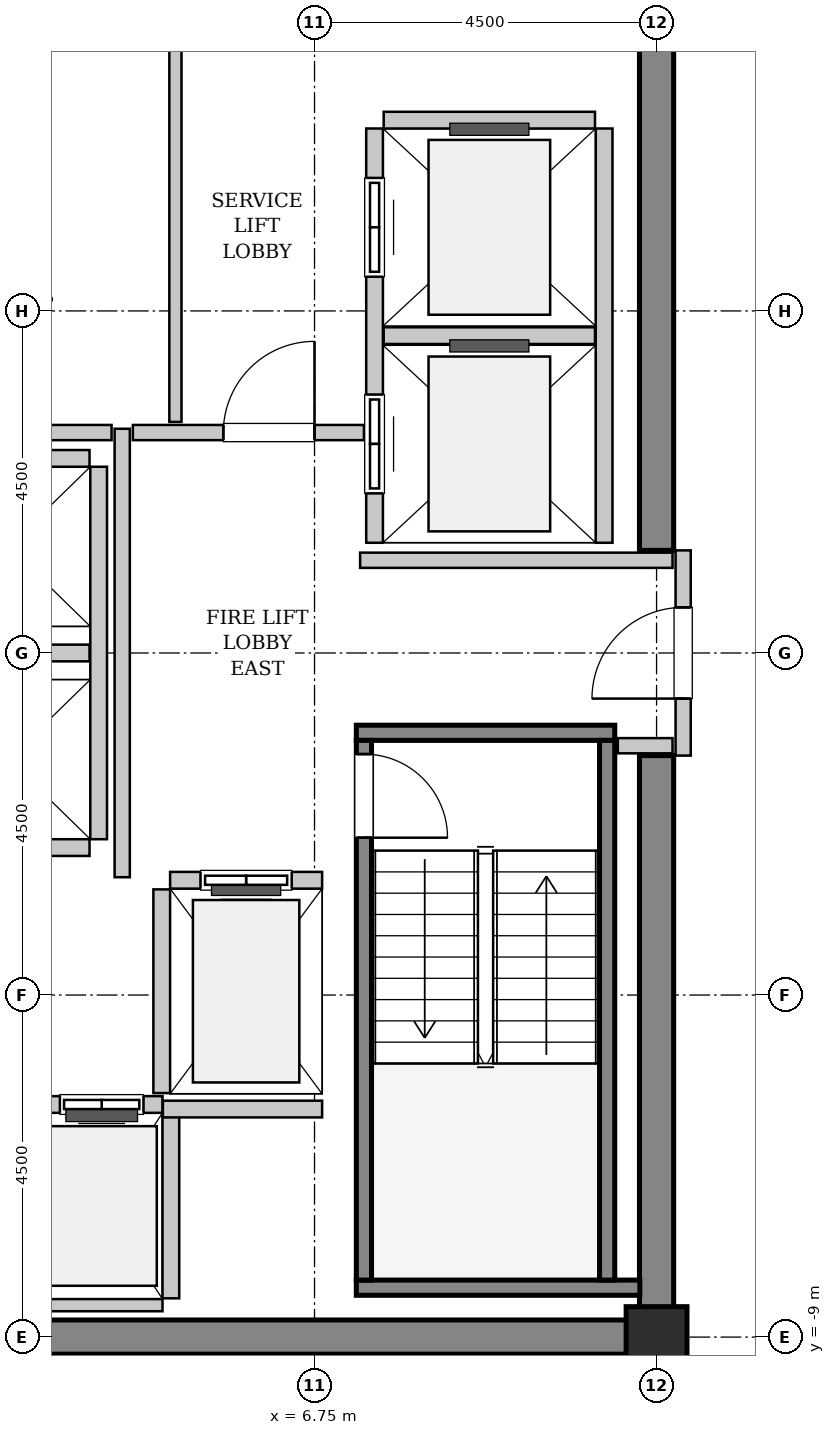
"""IFC4 building model, lengths in metres.
Left out: names, types, materials, properties, quantities, classifications, styles, units other than length and angle.
Written with IfcOpenShell. Run it as: python <this file> out.ifc"""

import sys

from ifc_helpers import new_model, si_unit, direction, frame, frame_2d, origin, origin_2d, place, context, subcontext, project, spatial, rectangle, hollow_rectangle, extrude, source, transform, mapped, element, fill, save


model = new_model("IFC4")
c1 = context("Model", 3, precision=1e-05, world=origin(), true_north=direction((0.0, 1.0)))
c2 = subcontext(c1, "Body", "Model", "MODEL_VIEW")
j1 = project(units=[si_unit("LENGTHUNIT", "METRE"), si_unit("PLANEANGLEUNIT", "RADIAN")], contexts=[c1])
p1 = place(None, origin())
s1 = spatial("IfcSite", under=j1, at=p1, CompositionType="ELEMENT")
p2 = place(p1, origin())
s2 = spatial("IfcBuilding", under=s1, at=p2, CompositionType="ELEMENT")
p3 = place(p2, frame((0.0, 0.0, 229.4)))
s3 = spatial("IfcBuildingStorey", under=s2, at=p3, CompositionType="ELEMENT", Elevation=229.4)
m1 = source(origin(), c2, "Body", "SweptSolid", [
    extrude(rectangle(XDim=9.925, YDim=0.45, at=frame_2d((4.962, 0.0))), origin(), (0.0, 0.0, 1.0), 3.8),
])
p4 = place(p3, frame((1.55, -9.0, 0.0), z_axis=(0.0, 0.0, 1.0), x_axis=(1.0, 0.0, 0.0)))
e1 = element("IfcWall", 1, at=p4, inside=s3, PredefinedType="SHEAR", context=c2, shape_type="MappedRepresentation", body=[
    mapped(m1, transform((0.0, 0.0, 0.0), x_axis=(1.0, 0.0, 0.0), y_axis=(0.0, 1.0, 0.0), z_axis=(0.0, 0.0, 1.0), scale=1.0)),
])
m2 = source(origin(), c2, "Body", "SweptSolid", [
    extrude(rectangle(XDim=7.425, YDim=0.45, at=frame_2d((3.712, 0.0))), origin(), (0.0, 0.0, 1.0), 3.8),
])
for number, where, z_axis, x_axis in (
    (2, (11.25, -8.775, 0.0), (0.0, 0.0, 1.0), (0.0, 1.0, 0.0)),
    (3, (11.25, 1.35, 0.0), (0.0, 0.0, 1.0), (0.0, 1.0, 0.0)),
):
    element("IfcWall", number, at=place(p3, frame(where, z_axis=z_axis, x_axis=x_axis)), inside=s3, PredefinedType="SHEAR", context=c2, shape_type="MappedRepresentation", body=[
        mapped(m2, transform((0.0, 0.0, 0.0), x_axis=(1.0, 0.0, 0.0), y_axis=(0.0, 1.0, 0.0), z_axis=(0.0, 0.0, 1.0), scale=1.0)),
    ])
m3 = source(origin(), c2, "Body", "SweptSolid", [
    extrude(hollow_rectangle(XDim=0.8, YDim=0.8, WallThickness=0.04, InnerFilletRadius=0.04, OuterFilletRadius=0.08, at=origin_2d()), origin(), (0.0, 0.0, 1.0), 3.8),
])
p5 = place(p3, frame((11.25, -9.0, 0.0), z_axis=(0.0, 0.0, 1.0), x_axis=(1.0, 0.0, 0.0)))
e4 = element("IfcColumn", 4, at=p5, inside=s3, PredefinedType="COLUMN", context=c2, shape_type="MappedRepresentation", body=[
    mapped(m3, transform((0.0, 0.0, 0.0), x_axis=(1.0, 0.0, 0.0), y_axis=(0.0, 1.0, 0.0), z_axis=(0.0, 0.0, 1.0), scale=1.0)),
])
m4 = source(origin(), c2, "Body", "SweptSolid", [
    extrude(rectangle(XDim=3.4, YDim=0.2, at=frame_2d((1.7, 0.0))), origin(), (0.0, 0.0, 1.0), 3.8),
])
p6 = place(p3, frame((7.3, -1.05, 0.0), z_axis=(0.0, 0.0, 1.0), x_axis=(1.0, 0.0, 0.0)))
e5 = element("IfcWall", 5, at=p6, inside=s3, PredefinedType="SOLIDWALL", context=c2, shape_type="MappedRepresentation", body=[
    mapped(m4, transform((0.0, 0.0, 0.0), x_axis=(1.0, 0.0, 0.0), y_axis=(0.0, 1.0, 0.0), z_axis=(0.0, 0.0, 1.0), scale=1.0)),
])
m5 = source(origin(), c2, "Body", "SweptSolid", [
    extrude(rectangle(XDim=3.73, YDim=0.2, at=frame_2d((1.865, 0.0))), origin(), (0.0, 0.0, 1.0), 3.8),
])
p7 = place(p3, frame((7.3, -8.35, 0.0), z_axis=(0.0, 0.0, 1.0), x_axis=(1.0, 0.0, 0.0)))
e6 = element("IfcWall", 6, at=p7, inside=s3, PredefinedType="SOLIDWALL", context=c2, shape_type="MappedRepresentation", body=[
    mapped(m5, transform((0.0, 0.0, 0.0), x_axis=(1.0, 0.0, 0.0), y_axis=(0.0, 1.0, 0.0), z_axis=(0.0, 0.0, 1.0), scale=1.0)),
])
m6 = source(origin(), c2, "Body", "SweptSolid", [
    extrude(rectangle(XDim=7.1, YDim=0.2, at=frame_2d((3.55, 0.0))), origin(), (0.0, 0.0, 1.0), 3.8),
])
p8 = place(p3, frame((7.4, -1.15, 0.0), z_axis=(0.0, 0.0, 1.0), x_axis=(0.0, -1.0, 0.0)))
e7 = element("IfcWall", 7, at=p8, inside=s3, PredefinedType="SOLIDWALL", context=c2, shape_type="MappedRepresentation", body=[
    mapped(m6, transform((0.0, 0.0, 0.0), x_axis=(1.0, 0.0, 0.0), y_axis=(0.0, 1.0, 0.0), z_axis=(0.0, 0.0, 1.0), scale=1.0)),
])
p9 = place(p8, frame((0.18, 0.0, 0.0)))
e8 = element("IfcOpeningElement", 8, at=p9, cuts=e7, PredefinedType="OPENING", context=c2, shape_type="SweptSolid", body=[
    extrude(rectangle(XDim=1.1, YDim=2.15, at=frame_2d((0.55, 1.075))), frame((0.0, 0.11, 0.0), z_axis=(0.0, -1.0, 0.0), x_axis=(1.0, 0.0, 0.0)), (0.0, 0.0, 1.0), 0.22),
])
p10 = place(p3, frame((10.6, -1.15, 0.0), z_axis=(0.0, 0.0, 1.0), x_axis=(0.0, -1.0, 0.0)))
e9 = element("IfcWall", 9, at=p10, inside=s3, PredefinedType="SOLIDWALL", context=c2, shape_type="MappedRepresentation", body=[
    mapped(m6, transform((0.0, 0.0, 0.0), x_axis=(1.0, 0.0, 0.0), y_axis=(0.0, 1.0, 0.0), z_axis=(0.0, 0.0, 1.0), scale=1.0)),
])
m7 = source(origin(), c2, "Body", "SweptSolid", [
    extrude(rectangle(XDim=2.0, YDim=0.22, at=frame_2d((1.0, 0.0))), origin(), (0.0, 0.0, 1.0), 3.535),
])
p11 = place(p3, frame((6.85, -2.99, 0.0), z_axis=(0.0, 0.0, 1.0), x_axis=(-1.0, 0.0, 0.0)))
e10 = element("IfcWall", 10, at=p11, inside=s3, PredefinedType="SOLIDWALL", context=c2, shape_type="MappedRepresentation", body=[
    mapped(m7, transform((0.0, 0.0, 0.0), x_axis=(1.0, 0.0, 0.0), y_axis=(0.0, 1.0, 0.0), z_axis=(0.0, 0.0, 1.0), scale=1.0)),
])
p12 = place(p11, frame((0.4, 0.0, 0.0)))
e11 = element("IfcOpeningElement", 11, at=p12, cuts=e10, PredefinedType="OPENING", context=c2, shape_type="SweptSolid", body=[
    extrude(rectangle(XDim=1.2, YDim=2.2, at=frame_2d((0.6, 1.1))), frame((0.0, 0.12, 0.0), z_axis=(0.0, -1.0, 0.0), x_axis=(1.0, 0.0, 0.0)), (0.0, 0.0, 1.0), 0.24),
])
m8 = source(origin(), c2, "Body", "SweptSolid", [
    extrude(rectangle(XDim=2.68, YDim=0.22, at=frame_2d((1.34, 0.0))), origin(), (0.0, 0.0, 1.0), 3.535),
])
p13 = place(p3, frame((4.74, -3.11, 0.0), z_axis=(0.0, 0.0, 1.0), x_axis=(0.0, -1.0, 0.0)))
e12 = element("IfcWall", 12, at=p13, inside=s3, PredefinedType="SOLIDWALL", context=c2, shape_type="MappedRepresentation", body=[
    mapped(m8, transform((0.0, 0.0, 0.0), x_axis=(1.0, 0.0, 0.0), y_axis=(0.0, 1.0, 0.0), z_axis=(0.0, 0.0, 1.0), scale=1.0)),
])
m9 = source(origin(), c2, "Body", "SweptSolid", [
    extrude(rectangle(XDim=5.45, YDim=0.22, at=frame_2d((2.725, 0.0))), origin(), (0.0, 0.0, 1.0), 3.535),
])
p14 = place(p3, frame((7.54, 6.9, 0.0), z_axis=(0.0, 0.0, 1.0), x_axis=(0.0, -1.0, 0.0)))
e13 = element("IfcWall", 13, at=p14, inside=s3, PredefinedType="SOLIDWALL", context=c2, shape_type="MappedRepresentation", body=[
    mapped(m9, transform((0.0, 0.0, 0.0), x_axis=(1.0, 0.0, 0.0), y_axis=(0.0, 1.0, 0.0), z_axis=(0.0, 0.0, 1.0), scale=1.0)),
])
p15 = place(p14, frame((3.5, 0.0, 0.0)))
e14 = element("IfcOpeningElement", 14, at=p15, cuts=e13, PredefinedType="OPENING", context=c2, shape_type="SweptSolid", body=[
    extrude(rectangle(XDim=1.3, YDim=2.3, at=frame_2d((0.65, 1.15))), frame((0.0, 0.12, 0.0), z_axis=(0.0, -1.0, 0.0), x_axis=(1.0, 0.0, 0.0)), (0.0, 0.0, 1.0), 0.24),
])
p16 = place(p14, frame((0.65, 0.0, 0.0)))
e15 = element("IfcOpeningElement", 15, at=p16, cuts=e13, PredefinedType="OPENING", context=c2, shape_type="SweptSolid", body=[
    extrude(rectangle(XDim=1.3, YDim=2.3, at=frame_2d((0.65, 1.15))), frame((0.0, 0.12, 0.0), z_axis=(0.0, -1.0, 0.0), x_axis=(1.0, 0.0, 0.0)), (0.0, 0.0, 1.0), 0.24),
])
p17 = place(p3, frame((10.56, 1.45, 0.0), z_axis=(0.0, 0.0, 1.0), x_axis=(0.0, 1.0, 0.0)))
e16 = element("IfcWall", 16, at=p17, inside=s3, PredefinedType="SOLIDWALL", context=c2, shape_type="MappedRepresentation", body=[
    mapped(m9, transform((0.0, 0.0, 0.0), x_axis=(1.0, 0.0, 0.0), y_axis=(0.0, 1.0, 0.0), z_axis=(0.0, 0.0, 1.0), scale=1.0)),
])
m10 = source(origin(), c2, "Body", "SweptSolid", [
    extrude(rectangle(XDim=2.78, YDim=0.22, at=frame_2d((1.39, 0.0))), origin(), (0.0, 0.0, 1.0), 3.535),
])
for number, where, z_axis, x_axis in (
    (17, (7.66, 4.175, 0.0), (0.0, 0.0, 1.0), (1.0, 0.0, 0.0)),
    (18, (10.44, 7.01, 0.0), (0.0, 0.0, 1.0), (-1.0, 0.0, 0.0)),
):
    element("IfcWall", number, at=place(p3, frame(where, z_axis=z_axis, x_axis=x_axis)), inside=s3, PredefinedType="SOLIDWALL", context=c2, shape_type="MappedRepresentation", body=[
        mapped(m10, transform((0.0, 0.0, 0.0), x_axis=(1.0, 0.0, 0.0), y_axis=(0.0, 1.0, 0.0), z_axis=(0.0, 0.0, 1.0), scale=1.0)),
    ])
m11 = source(origin(), c2, "Body", "SweptSolid", [
    extrude(rectangle(XDim=3.2, YDim=0.22, at=frame_2d((1.6, 0.0))), origin(), (0.0, 0.0, 1.0), 3.535),
])
p18 = place(p3, frame((4.75, -5.94, 0.0), z_axis=(0.0, 0.0, 1.0), x_axis=(-1.0, 0.0, 0.0)))
e19 = element("IfcWall", 19, at=p18, inside=s3, PredefinedType="SOLIDWALL", context=c2, shape_type="MappedRepresentation", body=[
    mapped(m11, transform((0.0, 0.0, 0.0), x_axis=(1.0, 0.0, 0.0), y_axis=(0.0, 1.0, 0.0), z_axis=(0.0, 0.0, 1.0), scale=1.0)),
])
p19 = place(p18, frame((1.875, 0.0, 0.0)))
e20 = element("IfcOpeningElement", 20, at=p19, cuts=e19, PredefinedType="OPENING", context=c2, shape_type="SweptSolid", body=[
    extrude(rectangle(XDim=1.1, YDim=2.2, at=frame_2d((0.55, 1.1))), frame((0.0, 0.12, 0.0), z_axis=(0.0, -1.0, 0.0), x_axis=(1.0, 0.0, 0.0)), (0.0, 0.0, 1.0), 0.24),
])
p20 = place(p18, frame((0.25, 0.0, 0.0)))
e21 = element("IfcOpeningElement", 21, at=p20, cuts=e19, PredefinedType="OPENING", context=c2, shape_type="SweptSolid", body=[
    extrude(rectangle(XDim=1.1, YDim=2.2, at=frame_2d((0.55, 1.1))), frame((0.0, 0.12, 0.0), z_axis=(0.0, -1.0, 0.0), x_axis=(1.0, 0.0, 0.0)), (0.0, 0.0, 1.0), 0.24),
])
m12 = source(origin(), c2, "Body", "SweptSolid", [
    extrude(rectangle(XDim=3.2, YDim=0.16, at=frame_2d((1.6, 0.0))), origin(), (0.0, 0.0, 1.0), 2.625),
])
p21 = place(p3, frame((1.55, -8.58, 0.0), z_axis=(0.0, 0.0, 1.0), x_axis=(1.0, 0.0, 0.0)))
e22 = element("IfcWall", 22, at=p21, inside=s3, PredefinedType="PARTITIONING", context=c2, shape_type="MappedRepresentation", body=[
    mapped(m12, transform((0.0, 0.0, 0.0), x_axis=(1.0, 0.0, 0.0), y_axis=(0.0, 1.0, 0.0), z_axis=(0.0, 0.0, 1.0), scale=1.0)),
])
m13 = source(origin(), c2, "Body", "SweptSolid", [
    extrude(rectangle(XDim=2.43, YDim=0.22, at=frame_2d((1.215, 0.0))), origin(), (0.0, 0.0, 1.0), 3.535),
])
p22 = place(p3, frame((4.86, -8.49, 0.0), z_axis=(0.0, 0.0, 1.0), x_axis=(0.0, 1.0, 0.0)))
e23 = element("IfcWall", 23, at=p22, inside=s3, PredefinedType="SOLIDWALL", context=c2, shape_type="MappedRepresentation", body=[
    mapped(m13, transform((0.0, 0.0, 0.0), x_axis=(1.0, 0.0, 0.0), y_axis=(0.0, 1.0, 0.0), z_axis=(0.0, 0.0, 1.0), scale=1.0)),
])
m14 = source(origin(), c2, "Body", "SweptSolid", [
    extrude(rectangle(XDim=4.9, YDim=0.22, at=frame_2d((2.45, 0.0))), origin(), (0.0, 0.0, 1.0), 3.535),
])
p23 = place(p3, frame((3.91, -2.45, 0.0), z_axis=(0.0, 0.0, 1.0), x_axis=(0.0, 1.0, 0.0)))
e24 = element("IfcWall", 24, at=p23, inside=s3, PredefinedType="SOLIDWALL", context=c2, shape_type="MappedRepresentation", body=[
    mapped(m14, transform((0.0, 0.0, 0.0), x_axis=(1.0, 0.0, 0.0), y_axis=(0.0, 1.0, 0.0), z_axis=(0.0, 0.0, 1.0), scale=1.0)),
])
m15 = source(origin(), c2, "Body", "SweptSolid", [
    extrude(rectangle(XDim=2.13, YDim=0.22, at=frame_2d((1.065, 0.0))), origin(), (0.0, 0.0, 1.0), 3.535),
])
for number, where, z_axis, x_axis in (
    (25, (1.66, -2.56, 0.0), (0.0, 0.0, 1.0), (1.0, 0.0, 0.0)),
    (26, (1.66, 0.0, 0.0), (0.0, 0.0, 1.0), (1.0, 0.0, 0.0)),
    (27, (3.79, 2.56, 0.0), (0.0, 0.0, 1.0), (-1.0, 0.0, 0.0)),
):
    element("IfcWall", number, at=place(p3, frame(where, z_axis=z_axis, x_axis=x_axis)), inside=s3, PredefinedType="SOLIDWALL", context=c2, shape_type="MappedRepresentation", body=[
        mapped(m15, transform((0.0, 0.0, 0.0), x_axis=(1.0, 0.0, 0.0), y_axis=(0.0, 1.0, 0.0), z_axis=(0.0, 0.0, 1.0), scale=1.0)),
    ])
m16 = source(origin(), c2, "Body", "SweptSolid", [
    extrude(rectangle(XDim=2.095, YDim=0.22, at=frame_2d((1.048, 0.0))), origin(), (0.0, 0.0, 1.0), 3.535),
])
p24 = place(p3, frame((4.755, -6.0, 0.0), z_axis=(0.0, 0.0, 1.0), x_axis=(1.0, 0.0, 0.0)))
e28 = element("IfcWall", 28, at=p24, inside=s3, PredefinedType="SOLIDWALL", context=c2, shape_type="MappedRepresentation", body=[
    mapped(m16, transform((0.0, 0.0, 0.0), x_axis=(1.0, 0.0, 0.0), y_axis=(0.0, 1.0, 0.0), z_axis=(0.0, 0.0, 1.0), scale=1.0)),
])
m17 = source(origin(), c2, "Body", "SweptSolid", [
    extrude(rectangle(XDim=2.7, YDim=0.2, at=frame_2d((1.35, 0.0))), origin(), (0.0, 0.0, 1.0), 2.625),
])
p25 = place(p3, frame((11.6, -1.35, 0.0), z_axis=(0.0, 0.0, 1.0), x_axis=(0.0, 1.0, 0.0)))
e29 = element("IfcWall", 29, at=p25, inside=s3, PredefinedType="PARTITIONING", context=c2, shape_type="MappedRepresentation", body=[
    mapped(m17, transform((0.0, 0.0, 0.0), x_axis=(1.0, 0.0, 0.0), y_axis=(0.0, 1.0, 0.0), z_axis=(0.0, 0.0, 1.0), scale=1.0)),
])
p26 = place(p25, frame((0.75, 0.0, 0.0)))
e30 = element("IfcOpeningElement", 30, at=p26, cuts=e29, PredefinedType="OPENING", context=c2, shape_type="SweptSolid", body=[
    extrude(rectangle(XDim=1.2, YDim=2.15, at=frame_2d((0.6, 1.075))), frame((0.0, 0.11, 0.0), z_axis=(0.0, -1.0, 0.0), x_axis=(1.0, 0.0, 0.0)), (0.0, 0.0, 1.0), 0.22),
])
m18 = source(origin(), c2, "Body", "SweptSolid", [
    extrude(rectangle(XDim=5.9, YDim=0.2, at=frame_2d((2.95, 0.0))), origin(), (0.0, 0.0, 1.0), 3.535),
])
p27 = place(p3, frame((4.22, -2.95, 0.0), z_axis=(0.0, 0.0, 1.0), x_axis=(0.0, 1.0, 0.0)))
e31 = element("IfcWall", 31, at=p27, inside=s3, PredefinedType="PARTITIONING", context=c2, shape_type="MappedRepresentation", body=[
    mapped(m18, transform((0.0, 0.0, 0.0), x_axis=(1.0, 0.0, 0.0), y_axis=(0.0, 1.0, 0.0), z_axis=(0.0, 0.0, 1.0), scale=1.0)),
])
m19 = source(origin(), c2, "Body", "SweptSolid", [
    extrude(rectangle(XDim=2.52, YDim=0.2, at=frame_2d((1.26, 0.0))), origin(), (0.0, 0.0, 1.0), 3.535),
])
p28 = place(p3, frame((1.56, 2.9, 0.0), z_axis=(0.0, 0.0, 1.0), x_axis=(1.0, 0.0, 0.0)))
e32 = element("IfcWall", 32, at=p28, inside=s3, PredefinedType="PARTITIONING", context=c2, shape_type="MappedRepresentation", body=[
    mapped(m19, transform((0.0, 0.0, 0.0), x_axis=(1.0, 0.0, 0.0), y_axis=(0.0, 1.0, 0.0), z_axis=(0.0, 0.0, 1.0), scale=1.0)),
])
m20 = source(origin(), c2, "Body", "SweptSolid", [
    extrude(rectangle(XDim=3.04, YDim=0.2, at=frame_2d((1.52, 0.0))), origin(), (0.0, 0.0, 1.0), 3.535),
])
p29 = place(p3, frame((4.36, 2.9, 0.0), z_axis=(0.0, 0.0, 1.0), x_axis=(1.0, 0.0, 0.0)))
e33 = element("IfcWall", 33, at=p29, inside=s3, PredefinedType="PARTITIONING", context=c2, shape_type="MappedRepresentation", body=[
    mapped(m20, transform((0.0, 0.0, 0.0), x_axis=(1.0, 0.0, 0.0), y_axis=(0.0, 1.0, 0.0), z_axis=(0.0, 0.0, 1.0), scale=1.0)),
])
p30 = place(p29, frame((1.19, 0.0, 0.0)))
e34 = element("IfcOpeningElement", 34, at=p30, cuts=e33, PredefinedType="OPENING", context=c2, shape_type="SweptSolid", body=[
    extrude(rectangle(XDim=1.2, YDim=2.15, at=frame_2d((0.6, 1.075))), frame((0.0, 0.11, 0.0), z_axis=(0.0, -1.0, 0.0), x_axis=(1.0, 0.0, 0.0)), (0.0, 0.0, 1.0), 0.22),
])
m21 = source(origin(), c2, "Body", "SweptSolid", [
    extrude(rectangle(XDim=4.11, YDim=0.2, at=frame_2d((2.055, 0.0))), origin(), (0.0, 0.0, 1.0), 3.535),
])
p31 = place(p3, frame((7.35, 1.22, 0.0), z_axis=(0.0, 0.0, 1.0), x_axis=(1.0, 0.0, 0.0)))
e35 = element("IfcWall", 35, at=p31, inside=s3, PredefinedType="PARTITIONING", context=c2, shape_type="MappedRepresentation", body=[
    mapped(m21, transform((0.0, 0.0, 0.0), x_axis=(1.0, 0.0, 0.0), y_axis=(0.0, 1.0, 0.0), z_axis=(0.0, 0.0, 1.0), scale=1.0)),
])
m22 = source(origin(), c2, "Body", "SweptSolid", [
    extrude(rectangle(XDim=0.72, YDim=0.2, at=frame_2d((0.36, 0.0))), origin(), (0.0, 0.0, 1.0), 3.535),
])
p32 = place(p3, frame((10.74, -1.22, 0.0), z_axis=(0.0, 0.0, 1.0), x_axis=(1.0, 0.0, 0.0)))
e36 = element("IfcWall", 36, at=p32, inside=s3, PredefinedType="PARTITIONING", context=c2, shape_type="MappedRepresentation", body=[
    mapped(m22, transform((0.0, 0.0, 0.0), x_axis=(1.0, 0.0, 0.0), y_axis=(0.0, 1.0, 0.0), z_axis=(0.0, 0.0, 1.0), scale=1.0)),
])
m23 = source(origin(), c2, "Body", "SweptSolid", [
    extrude(rectangle(XDim=5.45, YDim=0.16, at=frame_2d((2.725, 0.0))), origin(), (0.0, 0.0, 1.0), 3.535),
])
p33 = place(p3, frame((4.92, 3.04, 0.0), z_axis=(0.0, 0.0, 1.0), x_axis=(0.0, 1.0, 0.0)))
e37 = element("IfcWall", 37, at=p33, inside=s3, PredefinedType="PARTITIONING", context=c2, shape_type="MappedRepresentation", body=[
    mapped(m23, transform((0.0, 0.0, 0.0), x_axis=(1.0, 0.0, 0.0), y_axis=(0.0, 1.0, 0.0), z_axis=(0.0, 0.0, 1.0), scale=1.0)),
])
m24 = source(origin(), c2, "Body", "SweptSolid", [
    extrude(rectangle(XDim=1.1, YDim=2.15, at=frame_2d((0.55, 1.075))), frame((0.0, 0.025, 0.0), z_axis=(0.0, -1.0, 0.0), x_axis=(1.0, 0.0, 0.0)), (0.0, 0.0, 1.0), 0.05),
])
p34 = place(p9, origin())
e38 = element("IfcDoor", 38, at=p34, inside=s3, OperationType="SINGLE_SWING_RIGHT", PredefinedType="DOOR", context=c2, shape_type="MappedRepresentation", body=[
    mapped(m24, transform((0.0, 0.0, 0.0), x_axis=(1.0, 0.0, 0.0), y_axis=(0.0, 1.0, 0.0), z_axis=(0.0, 0.0, 1.0), scale=1.0)),
])
fill(e8, e38)
m25 = source(origin(), c2, "Body", "SweptSolid", [
    extrude(rectangle(XDim=1.2, YDim=2.2, at=frame_2d((0.6, 1.1))), frame((0.0, 0.025, 0.0), z_axis=(0.0, -1.0, 0.0), x_axis=(1.0, 0.0, 0.0)), (0.0, 0.0, 1.0), 0.05),
])
p35 = place(p12, origin())
e39 = element("IfcDoor", 39, at=p35, inside=s3, OperationType="SLIDING_TO_LEFT", PredefinedType="DOOR", context=c2, shape_type="MappedRepresentation", body=[
    mapped(m25, transform((0.0, 0.0, 0.0), x_axis=(1.0, 0.0, 0.0), y_axis=(0.0, 1.0, 0.0), z_axis=(0.0, 0.0, 1.0), scale=1.0)),
])
fill(e11, e39)
m26 = source(origin(), c2, "Body", "SweptSolid", [
    extrude(rectangle(XDim=1.3, YDim=2.3, at=frame_2d((0.65, 1.15))), frame((0.0, 0.025, 0.0), z_axis=(0.0, -1.0, 0.0), x_axis=(1.0, 0.0, 0.0)), (0.0, 0.0, 1.0), 0.05),
])
p36 = place(p15, origin())
e40 = element("IfcDoor", 40, at=p36, inside=s3, OperationType="SLIDING_TO_RIGHT", PredefinedType="DOOR", context=c2, shape_type="MappedRepresentation", body=[
    mapped(m26, transform((0.0, 0.0, 0.0), x_axis=(1.0, 0.0, 0.0), y_axis=(0.0, 1.0, 0.0), z_axis=(0.0, 0.0, 1.0), scale=1.0)),
])
fill(e14, e40)
p37 = place(p16, origin())
e41 = element("IfcDoor", 41, at=p37, inside=s3, OperationType="SLIDING_TO_RIGHT", PredefinedType="DOOR", context=c2, shape_type="MappedRepresentation", body=[
    mapped(m26, transform((0.0, 0.0, 0.0), x_axis=(1.0, 0.0, 0.0), y_axis=(0.0, 1.0, 0.0), z_axis=(0.0, 0.0, 1.0), scale=1.0)),
])
fill(e15, e41)
m27 = source(origin(), c2, "Body", "SweptSolid", [
    extrude(rectangle(XDim=1.1, YDim=2.2, at=frame_2d((0.55, 1.1))), frame((0.0, 0.025, 0.0), z_axis=(0.0, -1.0, 0.0), x_axis=(1.0, 0.0, 0.0)), (0.0, 0.0, 1.0), 0.05),
])
p38 = place(p20, origin())
e42 = element("IfcDoor", 42, at=p38, inside=s3, OperationType="DOUBLE_DOOR_SLIDING", PredefinedType="DOOR", context=c2, shape_type="MappedRepresentation", body=[
    mapped(m27, transform((0.0, 0.0, 0.0), x_axis=(1.0, 0.0, 0.0), y_axis=(0.0, 1.0, 0.0), z_axis=(0.0, 0.0, 1.0), scale=1.0)),
])
fill(e21, e42)
m28 = source(origin(), c2, "Body", "SweptSolid", [
    extrude(rectangle(XDim=1.2, YDim=2.15, at=frame_2d((0.6, 1.075))), frame((0.0, 0.025, 0.0), z_axis=(0.0, -1.0, 0.0), x_axis=(1.0, 0.0, 0.0)), (0.0, 0.0, 1.0), 0.05),
])
p39 = place(p26, origin())
e43 = element("IfcDoor", 43, at=p39, inside=s3, OperationType="SINGLE_SWING_LEFT", PredefinedType="DOOR", context=c2, shape_type="MappedRepresentation", body=[
    mapped(m28, transform((0.0, 0.0, 0.0), x_axis=(1.0, 0.0, 0.0), y_axis=(0.0, 1.0, 0.0), z_axis=(0.0, 0.0, 1.0), scale=1.0)),
])
fill(e30, e43)
p40 = place(p30, origin())
e44 = element("IfcDoor", 44, at=p40, inside=s3, OperationType="SINGLE_SWING_RIGHT", PredefinedType="DOOR", context=c2, shape_type="MappedRepresentation", body=[
    mapped(m28, transform((0.0, 0.0, 0.0), x_axis=(1.0, 0.0, 0.0), y_axis=(0.0, 1.0, 0.0), z_axis=(0.0, 0.0, 1.0), scale=1.0)),
])
fill(e34, e44)
save(model, sys.argv[1])
